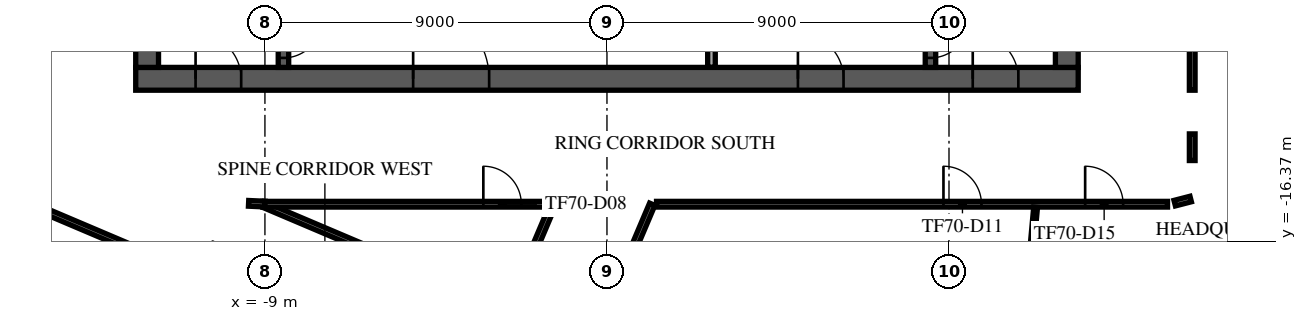
"""IFC4 building model, lengths in metres.
Left out: names, types, materials, properties, quantities, classifications, styles, units other than length and angle.
Written with IfcOpenShell. Run it as: python <this file> out.ifc"""

import sys

from ifc_helpers import new_model, si_unit, direction, frame, frame_2d, origin, place, context, subcontext, project, spatial, rectangle, extrude, element, fill, save


model = new_model("IFC4")
c1 = context("Model", 3, precision=1e-05, world=origin(), true_north=direction((0.0, 1.0)))
c2 = subcontext(c1, "Body", "Model", "MODEL_VIEW")
j1 = project(units=[si_unit("LENGTHUNIT", "METRE"), si_unit("PLANEANGLEUNIT", "RADIAN")], contexts=[c1])
p1 = place(None, origin())
s1 = spatial("IfcSite", under=j1, at=p1, CompositionType="ELEMENT")
p2 = place(p1, origin())
s2 = spatial("IfcBuilding", under=s1, at=p2, CompositionType="ELEMENT")
p3 = place(p2, frame((0.0, 0.0, 296.5)))
s3 = spatial("IfcBuildingStorey", under=s2, at=p3, CompositionType="ELEMENT", Elevation=296.5)
p4 = place(p3, frame((-12.4, -12.1, 0.0), z_axis=(0.0, 0.0, 1.0), x_axis=(1.0, 0.0, 0.0)))
e1 = element("IfcWall", 1, at=p4, inside=s3, PredefinedType="SHEAR", context=c2, shape_type="SweptSolid", body=[
    extrude(rectangle(XDim=24.8, YDim=0.6, at=frame_2d((12.4, 0.0))), origin(), (0.0, 0.0, 1.0), 3.65),
])
p5 = place(p4, frame((7.3, 0.0, 0.0)))
e2 = element("IfcOpeningElement", 2, at=p5, cuts=e1, PredefinedType="OPENING", context=c2, shape_type="SweptSolid", body=[
    extrude(rectangle(XDim=2.0, YDim=2.1, at=frame_2d((1.0, 1.05))), frame((0.0, 0.31, 0.0), z_axis=(0.0, -1.0, 0.0), x_axis=(1.0, 0.0, 0.0)), (0.0, 0.0, 1.0), 0.62),
])
p6 = place(p4, frame((17.425, 0.0, 0.0)))
e3 = element("IfcOpeningElement", 3, at=p6, cuts=e1, PredefinedType="OPENING", context=c2, shape_type="SweptSolid", body=[
    extrude(rectangle(XDim=1.2, YDim=2.1, at=frame_2d((0.6, 1.05))), frame((0.0, 0.31, 0.0), z_axis=(0.0, -1.0, 0.0), x_axis=(1.0, 0.0, 0.0)), (0.0, 0.0, 1.0), 0.62),
])
p7 = place(p4, frame((1.575, 0.0, 0.0)))
e4 = element("IfcOpeningElement", 4, at=p7, cuts=e1, PredefinedType="OPENING", context=c2, shape_type="SweptSolid", body=[
    extrude(rectangle(XDim=1.2, YDim=2.1, at=frame_2d((0.6, 1.05))), frame((0.0, 0.31, 0.0), z_axis=(0.0, -1.0, 0.0), x_axis=(1.0, 0.0, 0.0)), (0.0, 0.0, 1.0), 0.62),
])
p8 = place(p4, frame((22.025, 0.0, 0.0)))
e5 = element("IfcOpeningElement", 5, at=p8, cuts=e1, PredefinedType="OPENING", context=c2, shape_type="SweptSolid", body=[
    extrude(rectangle(XDim=1.2, YDim=2.1, at=frame_2d((0.6, 1.05))), frame((0.0, 0.31, 0.0), z_axis=(0.0, -1.0, 0.0), x_axis=(1.0, 0.0, 0.0)), (0.0, 0.0, 1.0), 0.62),
])
p9 = place(p3, frame((12.1, -11.8, 0.0), z_axis=(0.0, 0.0, 1.0), x_axis=(0.0, 1.0, 0.0)))
e6 = element("IfcWall", 6, at=p9, inside=s3, PredefinedType="SHEAR", context=c2, shape_type="SweptSolid", body=[
    extrude(rectangle(XDim=23.6, YDim=0.6, at=frame_2d((11.8, 0.0))), origin(), (0.0, 0.0, 1.0), 3.65),
])
p10 = place(p9, frame((10.6, 0.0, 0.0)))
e7 = element("IfcOpeningElement", 7, at=p10, cuts=e6, PredefinedType="OPENING", context=c2, shape_type="SweptSolid", body=[
    extrude(rectangle(XDim=2.4, YDim=2.4, at=frame_2d((1.2, 1.2))), frame((0.0, 0.31, 0.0), z_axis=(0.0, -1.0, 0.0), x_axis=(1.0, 0.0, 0.0)), (0.0, 0.0, 1.0), 0.62),
])
p11 = place(p3, frame((-12.1, -11.8, 0.0), z_axis=(0.0, 0.0, 1.0), x_axis=(0.0, 1.0, 0.0)))
e8 = element("IfcWall", 8, at=p11, inside=s3, PredefinedType="SHEAR", context=c2, shape_type="SweptSolid", body=[
    extrude(rectangle(XDim=23.6, YDim=0.6, at=frame_2d((11.8, 0.0))), origin(), (0.0, 0.0, 1.0), 3.65),
])
p12 = place(p11, frame((10.6, 0.0, 0.0)))
e9 = element("IfcOpeningElement", 9, at=p12, cuts=e8, PredefinedType="OPENING", context=c2, shape_type="SweptSolid", body=[
    extrude(rectangle(XDim=2.4, YDim=2.4, at=frame_2d((1.2, 1.2))), frame((0.0, 0.31, 0.0), z_axis=(0.0, -1.0, 0.0), x_axis=(1.0, 0.0, 0.0)), (0.0, 0.0, 1.0), 0.62),
])
p13 = place(p3, frame((-8.512, -4.55, 0.0), z_axis=(0.0, 0.0, 1.0), x_axis=(0.0, -1.0, 0.0)))
e10 = element("IfcWall", 10, at=p13, inside=s3, PredefinedType="SOLIDWALL", context=c2, shape_type="SweptSolid", body=[
    extrude(rectangle(XDim=7.25, YDim=0.275, at=frame_2d((3.625, 0.0))), origin(), (0.0, 0.0, 1.0), 3.65),
])
p14 = place(p13, frame((6.0, 0.0, 0.0)))
e11 = element("IfcOpeningElement", 11, at=p14, cuts=e10, PredefinedType="OPENING", context=c2, shape_type="SweptSolid", body=[
    extrude(rectangle(XDim=1.0, YDim=2.1, at=frame_2d((0.5, 1.05))), frame((0.0, 0.147, 0.0), z_axis=(0.0, -1.0, 0.0), x_axis=(1.0, 0.0, 0.0)), (0.0, 0.0, 1.0), 0.295),
])
p15 = place(p3, frame((8.512, -4.55, 0.0), z_axis=(0.0, 0.0, 1.0), x_axis=(0.0, -1.0, 0.0)))
e12 = element("IfcWall", 12, at=p15, inside=s3, PredefinedType="SOLIDWALL", context=c2, shape_type="SweptSolid", body=[
    extrude(rectangle(XDim=7.25, YDim=0.275, at=frame_2d((3.625, 0.0))), origin(), (0.0, 0.0, 1.0), 3.65),
])
p16 = place(p15, frame((6.0, 0.0, 0.0)))
e13 = element("IfcOpeningElement", 13, at=p16, cuts=e12, PredefinedType="OPENING", context=c2, shape_type="SweptSolid", body=[
    extrude(rectangle(XDim=1.0, YDim=2.1, at=frame_2d((0.5, 1.05))), frame((0.0, 0.147, 0.0), z_axis=(0.0, -1.0, 0.0), x_axis=(1.0, 0.0, 0.0)), (0.0, 0.0, 1.0), 0.295),
])
p17 = place(p3, frame((2.75, -11.795, 0.0), z_axis=(0.0, 0.0, 1.0), x_axis=(0.0, 1.0, 0.0)))
e14 = element("IfcWall", 14, at=p17, inside=s3, PredefinedType="PARTITIONING", context=c2, shape_type="SweptSolid", body=[
    extrude(rectangle(XDim=2.99, YDim=0.2, at=frame_2d((1.495, 0.0))), origin(), (0.0, 0.0, 1.0), 3.65),
])
p18 = place(p3, frame((15.204, -32.515, 0.0), z_axis=(0.0, 0.0, 1.0), x_axis=(0.390728997462, 0.920505758017, 0.0)))
e15 = element("IfcWall", 15, at=p18, inside=s3, PredefinedType="STANDARD", context=c2, shape_type="SweptSolid", body=[
    extrude(rectangle(XDim=47.979, YDim=0.6, at=frame_2d((23.99, 0.0))), origin(), (0.0, 0.0, 1.0), 3.65),
])
p19 = place(p18, frame((1.231, 0.0, 0.9)))
e16 = element("IfcOpeningElement", 16, at=p19, cuts=e15, PredefinedType="OPENING", context=c2, shape_type="SweptSolid", body=[
    extrude(rectangle(XDim=1.9, YDim=2.1, at=frame_2d((0.95, 1.05))), frame((0.0, 0.31, 0.0), z_axis=(0.0, -1.0, 0.0), x_axis=(1.0, 0.0, 0.0)), (0.0, 0.0, 1.0), 0.62),
])
p20 = place(p18, frame((5.593, 0.0, 0.9)))
e17 = element("IfcOpeningElement", 17, at=p20, cuts=e15, PredefinedType="OPENING", context=c2, shape_type="SweptSolid", body=[
    extrude(rectangle(XDim=1.9, YDim=2.1, at=frame_2d((0.95, 1.05))), frame((0.0, 0.31, 0.0), z_axis=(0.0, -1.0, 0.0), x_axis=(1.0, 0.0, 0.0)), (0.0, 0.0, 1.0), 0.62),
])
p21 = place(p18, frame((9.954, 0.0, 0.9)))
e18 = element("IfcOpeningElement", 18, at=p21, cuts=e15, PredefinedType="OPENING", context=c2, shape_type="SweptSolid", body=[
    extrude(rectangle(XDim=1.9, YDim=2.1, at=frame_2d((0.95, 1.05))), frame((0.0, 0.31, 0.0), z_axis=(0.0, -1.0, 0.0), x_axis=(1.0, 0.0, 0.0)), (0.0, 0.0, 1.0), 0.62),
])
p22 = place(p18, frame((14.316, 0.0, 0.9)))
e19 = element("IfcOpeningElement", 19, at=p22, cuts=e15, PredefinedType="OPENING", context=c2, shape_type="SweptSolid", body=[
    extrude(rectangle(XDim=1.9, YDim=2.1, at=frame_2d((0.95, 1.05))), frame((0.0, 0.31, 0.0), z_axis=(0.0, -1.0, 0.0), x_axis=(1.0, 0.0, 0.0)), (0.0, 0.0, 1.0), 0.62),
])
p23 = place(p18, frame((18.678, 0.0, 0.9)))
e20 = element("IfcOpeningElement", 20, at=p23, cuts=e15, PredefinedType="OPENING", context=c2, shape_type="SweptSolid", body=[
    extrude(rectangle(XDim=1.9, YDim=2.1, at=frame_2d((0.95, 1.05))), frame((0.0, 0.31, 0.0), z_axis=(0.0, -1.0, 0.0), x_axis=(1.0, 0.0, 0.0)), (0.0, 0.0, 1.0), 0.62),
])
p24 = place(p18, frame((23.04, 0.0, 0.9)))
e21 = element("IfcOpeningElement", 21, at=p24, cuts=e15, PredefinedType="OPENING", context=c2, shape_type="SweptSolid", body=[
    extrude(rectangle(XDim=1.9, YDim=2.1, at=frame_2d((0.95, 1.05))), frame((0.0, 0.31, 0.0), z_axis=(0.0, -1.0, 0.0), x_axis=(1.0, 0.0, 0.0)), (0.0, 0.0, 1.0), 0.62),
])
p25 = place(p18, frame((27.401, 0.0, 0.9)))
e22 = element("IfcOpeningElement", 22, at=p25, cuts=e15, PredefinedType="OPENING", context=c2, shape_type="SweptSolid", body=[
    extrude(rectangle(XDim=1.9, YDim=2.1, at=frame_2d((0.95, 1.05))), frame((0.0, 0.31, 0.0), z_axis=(0.0, -1.0, 0.0), x_axis=(1.0, 0.0, 0.0)), (0.0, 0.0, 1.0), 0.62),
])
p26 = place(p18, frame((31.763, 0.0, 0.9)))
e23 = element("IfcOpeningElement", 23, at=p26, cuts=e15, PredefinedType="OPENING", context=c2, shape_type="SweptSolid", body=[
    extrude(rectangle(XDim=1.9, YDim=2.1, at=frame_2d((0.95, 1.05))), frame((0.0, 0.31, 0.0), z_axis=(0.0, -1.0, 0.0), x_axis=(1.0, 0.0, 0.0)), (0.0, 0.0, 1.0), 0.62),
])
p27 = place(p18, frame((36.125, 0.0, 0.9)))
e24 = element("IfcOpeningElement", 24, at=p27, cuts=e15, PredefinedType="OPENING", context=c2, shape_type="SweptSolid", body=[
    extrude(rectangle(XDim=1.9, YDim=2.1, at=frame_2d((0.95, 1.05))), frame((0.0, 0.31, 0.0), z_axis=(0.0, -1.0, 0.0), x_axis=(1.0, 0.0, 0.0)), (0.0, 0.0, 1.0), 0.62),
])
p28 = place(p18, frame((40.487, 0.0, 0.9)))
e25 = element("IfcOpeningElement", 25, at=p28, cuts=e15, PredefinedType="OPENING", context=c2, shape_type="SweptSolid", body=[
    extrude(rectangle(XDim=1.9, YDim=2.1, at=frame_2d((0.95, 1.05))), frame((0.0, 0.31, 0.0), z_axis=(0.0, -1.0, 0.0), x_axis=(1.0, 0.0, 0.0)), (0.0, 0.0, 1.0), 0.62),
])
p29 = place(p18, frame((44.848, 0.0, 0.9)))
e26 = element("IfcOpeningElement", 26, at=p29, cuts=e15, PredefinedType="OPENING", context=c2, shape_type="SweptSolid", body=[
    extrude(rectangle(XDim=1.9, YDim=2.1, at=frame_2d((0.95, 1.05))), frame((0.0, 0.31, 0.0), z_axis=(0.0, -1.0, 0.0), x_axis=(1.0, 0.0, 0.0)), (0.0, 0.0, 1.0), 0.62),
])
p30 = place(p3, frame((-23.896, -11.711, 0.0), z_axis=(0.0, 0.0, 1.0), x_axis=(0.920507643781, -0.390724554821, 0.0)))
e27 = element("IfcWall", 27, at=p30, inside=s3, PredefinedType="PARTITIONING", context=c2, shape_type="SweptSolid", body=[
    extrude(rectangle(XDim=34.917, YDim=0.15, at=frame_2d((17.458, 0.0))), origin(), (0.0, 0.0, 1.0), 3.25),
])
p31 = place(p30, frame((7.05, 0.0, 0.0)))
e28 = element("IfcOpeningElement", 28, at=p31, cuts=e27, PredefinedType="OPENING", context=c2, shape_type="SweptSolid", body=[
    extrude(rectangle(XDim=1.8, YDim=2.1, at=frame_2d((0.9, 1.05))), frame((0.0, 0.085, 0.0), z_axis=(0.0, -1.0, 0.0), x_axis=(1.0, 0.0, 0.0)), (0.0, 0.0, 1.0), 0.17),
])
p32 = place(p30, frame((14.27, 0.0, 0.0)))
e29 = element("IfcOpeningElement", 29, at=p32, cuts=e27, PredefinedType="OPENING", context=c2, shape_type="SweptSolid", body=[
    extrude(rectangle(XDim=1.0, YDim=2.1, at=frame_2d((0.5, 1.05))), frame((0.0, 0.085, 0.0), z_axis=(0.0, -1.0, 0.0), x_axis=(1.0, 0.0, 0.0)), (0.0, 0.0, 1.0), 0.17),
])
p33 = place(p30, frame((29.011, 0.0, 0.0)))
e30 = element("IfcOpeningElement", 30, at=p33, cuts=e27, PredefinedType="OPENING", context=c2, shape_type="SweptSolid", body=[
    extrude(rectangle(XDim=1.0, YDim=2.1, at=frame_2d((0.5, 1.05))), frame((0.0, 0.085, 0.0), z_axis=(0.0, -1.0, 0.0), x_axis=(1.0, 0.0, 0.0)), (0.0, 0.0, 1.0), 0.17),
])
p34 = place(p3, frame((-9.054, -15.404, 0.0), z_axis=(0.0, 0.0, 1.0), x_axis=(0.920529927063, -0.390672053495, 0.0)))
e31 = element("IfcWall", 31, at=p34, inside=s3, PredefinedType="PARTITIONING", context=c2, shape_type="SweptSolid", body=[
    extrude(rectangle(XDim=7.029, YDim=0.15, at=frame_2d((3.514, 0.0))), origin(), (0.0, 0.0, 1.0), 3.25),
])
p35 = place(p3, frame((-9.053, -15.4, 0.0), z_axis=(0.0, 0.0, 1.0), x_axis=(1.0, 0.0, 0.0)))
e32 = element("IfcWall", 32, at=p35, inside=s3, PredefinedType="PARTITIONING", context=c2, shape_type="SweptSolid", body=[
    extrude(rectangle(XDim=7.636, YDim=0.15, at=frame_2d((3.818, 0.0))), origin(), (0.0, 0.0, 1.0), 3.25),
])
p36 = place(p35, frame((5.8, 0.0, 0.0)))
e33 = element("IfcOpeningElement", 33, at=p36, cuts=e32, PredefinedType="OPENING", context=c2, shape_type="SweptSolid", body=[
    extrude(rectangle(XDim=1.0, YDim=2.1, at=frame_2d((0.5, 1.05))), frame((0.0, 0.085, 0.0), z_axis=(0.0, -1.0, 0.0), x_axis=(1.0, 0.0, 0.0)), (0.0, 0.0, 1.0), 0.17),
])
p37 = place(p3, frame((-8.996, -15.397, 0.0), z_axis=(0.0, 0.0, 1.0), x_axis=(-0.998938201598, 0.046070265765, 0.0)))
e34 = element("IfcWall", 34, at=p37, inside=s3, PredefinedType="PARTITIONING", context=c2, shape_type="SweptSolid", body=[
    extrude(rectangle(XDim=0.435, YDim=0.15, at=frame_2d((0.217, 0.0))), origin(), (0.0, 0.0, 1.0), 3.65),
])
p38 = place(p3, frame((-2.555, -18.081, 0.0), z_axis=(0.0, 0.0, 1.0), x_axis=(0.39066407996, 0.920533310983, 0.0)))
e35 = element("IfcWall", 35, at=p38, inside=s3, PredefinedType="PARTITIONING", context=c2, shape_type="SweptSolid", body=[
    extrude(rectangle(XDim=2.799, YDim=0.15, at=frame_2d((1.399, 0.0))), origin(), (0.0, 0.0, 1.0), 3.25),
])
p39 = place(p3, frame((-0.346, -19.019, 0.0), z_axis=(0.0, 0.0, 1.0), x_axis=(0.390836874274, 0.920459959861, 0.0)))
e36 = element("IfcWall", 36, at=p39, inside=s3, PredefinedType="PARTITIONING", context=c2, shape_type="SweptSolid", body=[
    extrude(rectangle(XDim=3.932, YDim=0.15, at=frame_2d((1.966, 0.0))), origin(), (0.0, 0.0, 1.0), 3.65),
])
p40 = place(p3, frame((1.304, -15.4, 0.0), z_axis=(0.0, 0.0, 1.0), x_axis=(1.0, 0.0, 0.0)))
e37 = element("IfcWall", 37, at=p40, inside=s3, PredefinedType="PARTITIONING", context=c2, shape_type="SweptSolid", body=[
    extrude(rectangle(XDim=13.446, YDim=0.15, at=frame_2d((6.723, 0.0))), origin(), (0.0, 0.0, 1.0), 3.25),
])
p41 = place(p40, frame((7.55, 0.0, 0.0)))
e38 = element("IfcOpeningElement", 38, at=p41, cuts=e37, PredefinedType="OPENING", context=c2, shape_type="SweptSolid", body=[
    extrude(rectangle(XDim=1.0, YDim=2.1, at=frame_2d((0.5, 1.05))), frame((0.0, 0.085, 0.0), z_axis=(0.0, -1.0, 0.0), x_axis=(1.0, 0.0, 0.0)), (0.0, 0.0, 1.0), 0.17),
])
p42 = place(p40, frame((11.278, 0.0, 0.0)))
e39 = element("IfcOpeningElement", 39, at=p42, cuts=e37, PredefinedType="OPENING", context=c2, shape_type="SweptSolid", body=[
    extrude(rectangle(XDim=1.0, YDim=2.1, at=frame_2d((0.5, 1.05))), frame((0.0, 0.085, 0.0), z_axis=(0.0, -1.0, 0.0), x_axis=(1.0, 0.0, 0.0)), (0.0, 0.0, 1.0), 0.17),
])
p43 = place(p3, frame((15.36, -15.263, 0.0), z_axis=(0.0, 0.0, 1.0), x_axis=(-0.968229060736, -0.250064963452, 0.0)))
e40 = element("IfcWall", 40, at=p43, inside=s3, PredefinedType="PARTITIONING", context=c2, shape_type="SweptSolid", body=[
    extrude(rectangle(XDim=0.435, YDim=0.15, at=frame_2d((0.217, 0.0))), origin(), (0.0, 0.0, 1.0), 3.25),
])
p44 = place(p3, frame((15.4, -14.25, 0.0), z_axis=(0.0, 0.0, 1.0), x_axis=(0.0, 1.0, 0.0)))
e41 = element("IfcWall", 41, at=p44, inside=s3, PredefinedType="PARTITIONING", context=c2, shape_type="SweptSolid", body=[
    extrude(rectangle(XDim=0.7, YDim=0.15, at=frame_2d((0.35, 0.0))), origin(), (0.0, 0.0, 1.0), 3.65),
])
p45 = place(p3, frame((15.4, -12.4, 0.0), z_axis=(0.0, 0.0, 1.0), x_axis=(0.0, 1.0, 0.0)))
e42 = element("IfcWall", 42, at=p45, inside=s3, PredefinedType="PARTITIONING", context=c2, shape_type="SweptSolid", body=[
    extrude(rectangle(XDim=24.725, YDim=0.15, at=frame_2d((12.362, 0.0))), origin(), (0.0, 0.0, 1.0), 3.25),
])
p46 = place(p45, frame((2.8, 0.0, 0.0)))
e43 = element("IfcOpeningElement", 43, at=p46, cuts=e42, PredefinedType="OPENING", context=c2, shape_type="SweptSolid", body=[
    extrude(rectangle(XDim=1.8, YDim=2.1, at=frame_2d((0.9, 1.05))), frame((0.0, 0.085, 0.0), z_axis=(0.0, -1.0, 0.0), x_axis=(1.0, 0.0, 0.0)), (0.0, 0.0, 1.0), 0.17),
])
p47 = place(p45, frame((10.84, 0.0, 0.0)))
e44 = element("IfcOpeningElement", 44, at=p47, cuts=e42, PredefinedType="OPENING", context=c2, shape_type="SweptSolid", body=[
    extrude(rectangle(XDim=1.8, YDim=2.1, at=frame_2d((0.9, 1.05))), frame((0.0, 0.085, 0.0), z_axis=(0.0, -1.0, 0.0), x_axis=(1.0, 0.0, 0.0)), (0.0, 0.0, 1.0), 0.17),
])
p48 = place(p45, frame((17.59, 0.0, 0.0)))
e45 = element("IfcOpeningElement", 45, at=p48, cuts=e42, PredefinedType="OPENING", context=c2, shape_type="SweptSolid", body=[
    extrude(rectangle(XDim=1.0, YDim=2.1, at=frame_2d((0.5, 1.05))), frame((0.0, 0.085, 0.0), z_axis=(0.0, -1.0, 0.0), x_axis=(1.0, 0.0, 0.0)), (0.0, 0.0, 1.0), 0.17),
])
p49 = place(p45, frame((20.086, 0.0, 0.0)))
e46 = element("IfcOpeningElement", 46, at=p49, cuts=e42, PredefinedType="OPENING", context=c2, shape_type="SweptSolid", body=[
    extrude(rectangle(XDim=1.8, YDim=2.1, at=frame_2d((0.9, 1.05))), frame((0.0, 0.085, 0.0), z_axis=(0.0, -1.0, 0.0), x_axis=(1.0, 0.0, 0.0)), (0.0, 0.0, 1.0), 0.17),
])
p50 = place(p3, frame((9.995, -29.577, 0.0), z_axis=(0.0, 0.0, 1.0), x_axis=(0.090666368484, 0.995881323063, 0.0)))
e47 = element("IfcWall", 47, at=p50, inside=s3, PredefinedType="PARTITIONING", context=c2, shape_type="SweptSolid", body=[
    extrude(rectangle(XDim=14.156, YDim=0.1, at=frame_2d((7.078, 0.0))), origin(), (0.0, 0.0, 1.0), 3.65),
])
p51 = place(p5, origin())
e48 = element("IfcDoor", 48, at=p51, inside=s3, OperationType="SINGLE_SWING_LEFT", PredefinedType="DOOR", context=c2, shape_type="SweptSolid", body=[
    extrude(rectangle(XDim=2.0, YDim=2.1, at=frame_2d((1.0, 1.05))), frame((0.0, 0.025, 0.0), z_axis=(0.0, -1.0, 0.0), x_axis=(1.0, 0.0, 0.0)), (0.0, 0.0, 1.0), 0.05),
])
fill(e2, e48)
p52 = place(p6, origin())
e49 = element("IfcDoor", 49, at=p52, inside=s3, OperationType="SINGLE_SWING_LEFT", PredefinedType="DOOR", context=c2, shape_type="SweptSolid", body=[
    extrude(rectangle(XDim=1.2, YDim=2.1, at=frame_2d((0.6, 1.05))), frame((0.0, 0.025, 0.0), z_axis=(0.0, -1.0, 0.0), x_axis=(1.0, 0.0, 0.0)), (0.0, 0.0, 1.0), 0.05),
])
fill(e3, e49)
p53 = place(p7, origin())
e50 = element("IfcDoor", 50, at=p53, inside=s3, OperationType="SINGLE_SWING_LEFT", PredefinedType="DOOR", context=c2, shape_type="SweptSolid", body=[
    extrude(rectangle(XDim=1.2, YDim=2.1, at=frame_2d((0.6, 1.05))), frame((0.0, 0.025, 0.0), z_axis=(0.0, -1.0, 0.0), x_axis=(1.0, 0.0, 0.0)), (0.0, 0.0, 1.0), 0.05),
])
fill(e4, e50)
p54 = place(p8, origin())
e51 = element("IfcDoor", 51, at=p54, inside=s3, OperationType="SINGLE_SWING_LEFT", PredefinedType="DOOR", context=c2, shape_type="SweptSolid", body=[
    extrude(rectangle(XDim=1.2, YDim=2.1, at=frame_2d((0.6, 1.05))), frame((0.0, 0.025, 0.0), z_axis=(0.0, -1.0, 0.0), x_axis=(1.0, 0.0, 0.0)), (0.0, 0.0, 1.0), 0.05),
])
fill(e5, e51)
p55 = place(p14, origin())
e52 = element("IfcDoor", 52, at=p55, inside=s3, OperationType="SINGLE_SWING_LEFT", PredefinedType="DOOR", context=c2, shape_type="SweptSolid", body=[
    extrude(rectangle(XDim=1.0, YDim=2.1, at=frame_2d((0.5, 1.05))), frame((0.0, 0.025, 0.0), z_axis=(0.0, -1.0, 0.0), x_axis=(1.0, 0.0, 0.0)), (0.0, 0.0, 1.0), 0.05),
])
fill(e11, e52)
p56 = place(p16, origin())
e53 = element("IfcDoor", 53, at=p56, inside=s3, OperationType="SINGLE_SWING_LEFT", PredefinedType="DOOR", context=c2, shape_type="SweptSolid", body=[
    extrude(rectangle(XDim=1.0, YDim=2.1, at=frame_2d((0.5, 1.05))), frame((0.0, 0.025, 0.0), z_axis=(0.0, -1.0, 0.0), x_axis=(1.0, 0.0, 0.0)), (0.0, 0.0, 1.0), 0.05),
])
fill(e13, e53)
p57 = place(p36, frame((1.0, 0.0, 0.0), z_axis=(0.0, 0.0, 1.0), x_axis=(-1.0, 0.0, 0.0)))
e54 = element("IfcDoor", 54, at=p57, inside=s3, OperationType="SINGLE_SWING_RIGHT", PredefinedType="DOOR", context=c2, shape_type="SweptSolid", body=[
    extrude(rectangle(XDim=1.0, YDim=2.1, at=frame_2d((0.5, 1.05))), frame((0.0, 0.025, 0.0), z_axis=(0.0, -1.0, 0.0), x_axis=(1.0, 0.0, 0.0)), (0.0, 0.0, 1.0), 0.05),
])
fill(e33, e54)
p58 = place(p41, frame((1.0, 0.0, 0.0), z_axis=(0.0, 0.0, 1.0), x_axis=(-1.0, 0.0, 0.0)))
e55 = element("IfcDoor", 55, at=p58, inside=s3, OperationType="SINGLE_SWING_RIGHT", PredefinedType="DOOR", context=c2, shape_type="SweptSolid", body=[
    extrude(rectangle(XDim=1.0, YDim=2.1, at=frame_2d((0.5, 1.05))), frame((0.0, 0.025, 0.0), z_axis=(0.0, -1.0, 0.0), x_axis=(1.0, 0.0, 0.0)), (0.0, 0.0, 1.0), 0.05),
])
fill(e38, e55)
p59 = place(p42, frame((1.0, 0.0, 0.0), z_axis=(0.0, 0.0, 1.0), x_axis=(-1.0, 0.0, 0.0)))
e56 = element("IfcDoor", 56, at=p59, inside=s3, OperationType="SINGLE_SWING_RIGHT", PredefinedType="DOOR", context=c2, shape_type="SweptSolid", body=[
    extrude(rectangle(XDim=1.0, YDim=2.1, at=frame_2d((0.5, 1.05))), frame((0.0, 0.025, 0.0), z_axis=(0.0, -1.0, 0.0), x_axis=(1.0, 0.0, 0.0)), (0.0, 0.0, 1.0), 0.05),
])
fill(e39, e56)
save(model, sys.argv[1])
